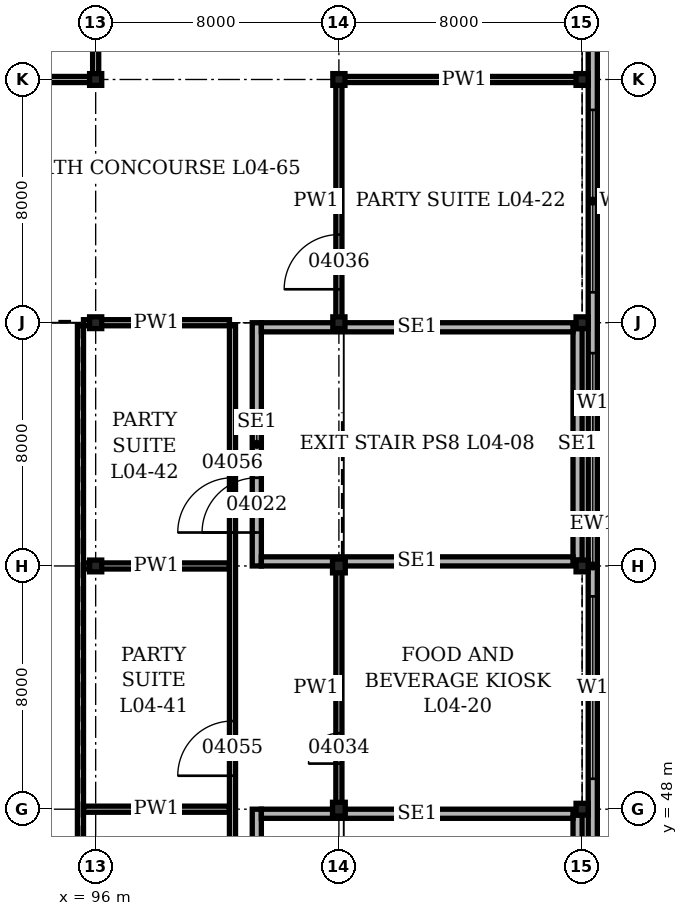
"""IFC4 building model, lengths in metres.
Left out: names, types, materials, properties, quantities, classifications, styles, units other than length and angle.
Written with IfcOpenShell. Run it as: python <this file> out.ifc"""

import sys

from ifc_helpers import new_model, si_unit, direction, frame, frame_2d, origin, origin_2d, place, context, subcontext, project, spatial, rectangle, i_section, extrude, element, fill, save


model = new_model("IFC4")
c1 = context("Model", 3, precision=1e-05, world=origin(), true_north=direction((0.0, 1.0)))
c2 = subcontext(c1, "Body", "Model", "MODEL_VIEW")
j1 = project(units=[si_unit("LENGTHUNIT", "METRE"), si_unit("PLANEANGLEUNIT", "RADIAN")], contexts=[c1])
p1 = place(None, origin())
s1 = spatial("IfcSite", under=j1, at=p1, CompositionType="ELEMENT")
p2 = place(p1, origin())
s2 = spatial("IfcBuilding", under=s1, at=p2, CompositionType="ELEMENT")
p3 = place(p2, frame((0.0, 0.0, 19.9)))
s3 = spatial("IfcBuildingStorey", under=s2, at=p3, CompositionType="ELEMENT", Elevation=19.9)
for number, where, z_axis, x_axis in (
    (1, (96.0, 56.0, 0.0), (0.0, 0.0, 1.0), (1.0, 0.0, 0.0)),
    (2, (96.0, 64.0, 0.0), (0.0, 0.0, 1.0), (1.0, 0.0, 0.0)),
    (3, (96.0, 72.0, 0.0), (0.0, 0.0, 1.0), (1.0, 0.0, 0.0)),
):
    element("IfcColumn", number, at=place(p3, frame(where, z_axis=z_axis, x_axis=x_axis)), inside=s3, PredefinedType="COLUMN", context=c2, shape_type="SweptSolid", body=[
        extrude(i_section(OverallWidth=0.399, OverallDepth=0.386, WebThickness=0.021, FlangeThickness=0.033, at=origin_2d()), origin(), (0.0, 0.0, 1.0), 6.0),
    ])
for number, where, z_axis, x_axis in (
    (4, (104.0, 48.0, 0.0), (0.0, 0.0, 1.0), (1.0, 0.0, 0.0)),
    (5, (104.0, 56.0, 0.0), (0.0, 0.0, 1.0), (1.0, 0.0, 0.0)),
):
    element("IfcColumn", number, at=place(p3, frame(where, z_axis=z_axis, x_axis=x_axis)), inside=s3, PredefinedType="COLUMN", context=c2, shape_type="SweptSolid", body=[
        extrude(i_section(OverallWidth=0.419, OverallDepth=0.455, WebThickness=0.042, FlangeThickness=0.068, at=origin_2d()), origin(), (0.0, 0.0, 1.0), 6.0),
    ])
for number, where, z_axis, x_axis in (
    (6, (104.0, 64.0, 0.0), (0.0, 0.0, 1.0), (1.0, 0.0, 0.0)),
    (7, (104.0, 72.0, 0.0), (0.0, 0.0, 1.0), (1.0, 0.0, 0.0)),
    (8, (112.0, 48.0, 0.0), (0.0, 0.0, 1.0), (1.0, 0.0, 0.0)),
    (9, (112.0, 56.0, 0.0), (0.0, 0.0, 1.0), (1.0, 0.0, 0.0)),
    (10, (112.0, 64.0, 0.0), (0.0, 0.0, 1.0), (1.0, 0.0, 0.0)),
    (11, (112.0, 72.0, 0.0), (0.0, 0.0, 1.0), (1.0, 0.0, 0.0)),
):
    element("IfcColumn", number, at=place(p3, frame(where, z_axis=z_axis, x_axis=x_axis)), inside=s3, PredefinedType="COLUMN", context=c2, shape_type="SweptSolid", body=[
        extrude(i_section(OverallWidth=0.399, OverallDepth=0.386, WebThickness=0.021, FlangeThickness=0.033, at=origin_2d()), origin(), (0.0, 0.0, 1.0), 6.0),
    ])
p4 = place(p3, frame((112.35, -0.35, 0.0), z_axis=(0.0, 0.0, 1.0), x_axis=(0.0, 1.0, 0.0)))
e12 = element("IfcWall", 12, at=p4, inside=s3, PredefinedType="SOLIDWALL", context=c2, shape_type="SweptSolid", body=[
    extrude(rectangle(XDim=112.7, YDim=0.3, at=frame_2d((56.35, 0.0))), origin(), (0.0, 0.0, 1.0), 6.0),
])
p5 = place(p4, frame((1.35, 0.0, 1.0)))
e13 = element("IfcOpeningElement", 13, at=p5, cuts=e12, PredefinedType="OPENING", context=c2, shape_type="SweptSolid", body=[
    extrude(rectangle(XDim=6.0, YDim=1.5, at=frame_2d((3.0, 0.75))), frame((0.0, 0.16, 0.0), z_axis=(0.0, -1.0, 0.0), x_axis=(1.0, 0.0, 0.0)), (0.0, 0.0, 1.0), 0.32),
])
p6 = place(p4, frame((9.35, 0.0, 1.0)))
e14 = element("IfcOpeningElement", 14, at=p6, cuts=e12, PredefinedType="OPENING", context=c2, shape_type="SweptSolid", body=[
    extrude(rectangle(XDim=6.0, YDim=1.5, at=frame_2d((3.0, 0.75))), frame((0.0, 0.16, 0.0), z_axis=(0.0, -1.0, 0.0), x_axis=(1.0, 0.0, 0.0)), (0.0, 0.0, 1.0), 0.32),
])
p7 = place(p4, frame((17.35, 0.0, 1.0)))
e15 = element("IfcOpeningElement", 15, at=p7, cuts=e12, PredefinedType="OPENING", context=c2, shape_type="SweptSolid", body=[
    extrude(rectangle(XDim=6.0, YDim=1.5, at=frame_2d((3.0, 0.75))), frame((0.0, 0.16, 0.0), z_axis=(0.0, -1.0, 0.0), x_axis=(1.0, 0.0, 0.0)), (0.0, 0.0, 1.0), 0.32),
])
p8 = place(p4, frame((25.35, 0.0, 1.0)))
e16 = element("IfcOpeningElement", 16, at=p8, cuts=e12, PredefinedType="OPENING", context=c2, shape_type="SweptSolid", body=[
    extrude(rectangle(XDim=6.0, YDim=1.5, at=frame_2d((3.0, 0.75))), frame((0.0, 0.16, 0.0), z_axis=(0.0, -1.0, 0.0), x_axis=(1.0, 0.0, 0.0)), (0.0, 0.0, 1.0), 0.32),
])
p9 = place(p4, frame((33.35, 0.0, 1.0)))
e17 = element("IfcOpeningElement", 17, at=p9, cuts=e12, PredefinedType="OPENING", context=c2, shape_type="SweptSolid", body=[
    extrude(rectangle(XDim=6.0, YDim=1.5, at=frame_2d((3.0, 0.75))), frame((0.0, 0.16, 0.0), z_axis=(0.0, -1.0, 0.0), x_axis=(1.0, 0.0, 0.0)), (0.0, 0.0, 1.0), 0.32),
])
p10 = place(p4, frame((41.35, 0.0, 1.0)))
e18 = element("IfcOpeningElement", 18, at=p10, cuts=e12, PredefinedType="OPENING", context=c2, shape_type="SweptSolid", body=[
    extrude(rectangle(XDim=6.0, YDim=1.5, at=frame_2d((3.0, 0.75))), frame((0.0, 0.16, 0.0), z_axis=(0.0, -1.0, 0.0), x_axis=(1.0, 0.0, 0.0)), (0.0, 0.0, 1.0), 0.32),
])
p11 = place(p4, frame((49.35, 0.0, 1.0)))
e19 = element("IfcOpeningElement", 19, at=p11, cuts=e12, PredefinedType="OPENING", context=c2, shape_type="SweptSolid", body=[
    extrude(rectangle(XDim=6.0, YDim=1.5, at=frame_2d((3.0, 0.75))), frame((0.0, 0.16, 0.0), z_axis=(0.0, -1.0, 0.0), x_axis=(1.0, 0.0, 0.0)), (0.0, 0.0, 1.0), 0.32),
])
p12 = place(p4, frame((57.35, 0.0, 1.0)))
e20 = element("IfcOpeningElement", 20, at=p12, cuts=e12, PredefinedType="OPENING", context=c2, shape_type="SweptSolid", body=[
    extrude(rectangle(XDim=6.0, YDim=1.5, at=frame_2d((3.0, 0.75))), frame((0.0, 0.16, 0.0), z_axis=(0.0, -1.0, 0.0), x_axis=(1.0, 0.0, 0.0)), (0.0, 0.0, 1.0), 0.32),
])
p13 = place(p4, frame((65.35, 0.0, 1.0)))
e21 = element("IfcOpeningElement", 21, at=p13, cuts=e12, PredefinedType="OPENING", context=c2, shape_type="SweptSolid", body=[
    extrude(rectangle(XDim=6.0, YDim=1.5, at=frame_2d((3.0, 0.75))), frame((0.0, 0.16, 0.0), z_axis=(0.0, -1.0, 0.0), x_axis=(1.0, 0.0, 0.0)), (0.0, 0.0, 1.0), 0.32),
])
p14 = place(p4, frame((73.35, 0.0, 1.0)))
e22 = element("IfcOpeningElement", 22, at=p14, cuts=e12, PredefinedType="OPENING", context=c2, shape_type="SweptSolid", body=[
    extrude(rectangle(XDim=6.0, YDim=1.5, at=frame_2d((3.0, 0.75))), frame((0.0, 0.16, 0.0), z_axis=(0.0, -1.0, 0.0), x_axis=(1.0, 0.0, 0.0)), (0.0, 0.0, 1.0), 0.32),
])
p15 = place(p4, frame((81.35, 0.0, 1.0)))
e23 = element("IfcOpeningElement", 23, at=p15, cuts=e12, PredefinedType="OPENING", context=c2, shape_type="SweptSolid", body=[
    extrude(rectangle(XDim=6.0, YDim=1.5, at=frame_2d((3.0, 0.75))), frame((0.0, 0.16, 0.0), z_axis=(0.0, -1.0, 0.0), x_axis=(1.0, 0.0, 0.0)), (0.0, 0.0, 1.0), 0.32),
])
p16 = place(p4, frame((89.35, 0.0, 1.0)))
e24 = element("IfcOpeningElement", 24, at=p16, cuts=e12, PredefinedType="OPENING", context=c2, shape_type="SweptSolid", body=[
    extrude(rectangle(XDim=6.0, YDim=1.5, at=frame_2d((3.0, 0.75))), frame((0.0, 0.16, 0.0), z_axis=(0.0, -1.0, 0.0), x_axis=(1.0, 0.0, 0.0)), (0.0, 0.0, 1.0), 0.32),
])
p17 = place(p4, frame((97.35, 0.0, 1.0)))
e25 = element("IfcOpeningElement", 25, at=p17, cuts=e12, PredefinedType="OPENING", context=c2, shape_type="SweptSolid", body=[
    extrude(rectangle(XDim=6.0, YDim=1.5, at=frame_2d((3.0, 0.75))), frame((0.0, 0.16, 0.0), z_axis=(0.0, -1.0, 0.0), x_axis=(1.0, 0.0, 0.0)), (0.0, 0.0, 1.0), 0.32),
])
p18 = place(p4, frame((105.35, 0.0, 1.0)))
e26 = element("IfcOpeningElement", 26, at=p18, cuts=e12, PredefinedType="OPENING", context=c2, shape_type="SweptSolid", body=[
    extrude(rectangle(XDim=6.0, YDim=1.5, at=frame_2d((3.0, 0.75))), frame((0.0, 0.16, 0.0), z_axis=(0.0, -1.0, 0.0), x_axis=(1.0, 0.0, 0.0)), (0.0, 0.0, 1.0), 0.32),
])
p19 = place(p3, frame((101.3, 40.0, 0.0), z_axis=(0.0, 0.0, 1.0), x_axis=(0.0, 1.0, 0.0)))
e27 = element("IfcWall", 27, at=p19, inside=s3, PredefinedType="SOLIDWALL", context=c2, shape_type="SweptSolid", body=[
    extrude(rectangle(XDim=8.0, YDim=0.3, at=frame_2d((4.0, 0.0))), origin(), (0.0, 0.0, 1.0), 5.75),
])
p20 = place(p19, frame((1.1, 0.0, 0.0)))
e28 = element("IfcOpeningElement", 28, at=p20, cuts=e27, PredefinedType="OPENING", context=c2, shape_type="SweptSolid", body=[
    extrude(rectangle(XDim=1.8, YDim=2.1, at=frame_2d((0.9, 1.05))), frame((0.0, 0.16, 0.0), z_axis=(0.0, -1.0, 0.0), x_axis=(1.0, 0.0, 0.0)), (0.0, 0.0, 1.0), 0.32),
])
p21 = place(p3, frame((111.85, 40.193, 0.0), z_axis=(0.0, 0.0, 1.0), x_axis=(0.0, 1.0, 0.0)))
e29 = element("IfcWall", 29, at=p21, inside=s3, PredefinedType="SOLIDWALL", context=c2, shape_type="SweptSolid", body=[
    extrude(rectangle(XDim=7.614, YDim=0.3, at=frame_2d((3.807, 0.0))), origin(), (0.0, 0.0, 1.0), 5.75),
])
p22 = place(p3, frame((101.45, 47.85, 0.0), z_axis=(0.0, 0.0, 1.0), x_axis=(1.0, 0.0, 0.0)))
e30 = element("IfcWall", 30, at=p22, inside=s3, PredefinedType="SOLIDWALL", context=c2, shape_type="SweptSolid", body=[
    extrude(rectangle(XDim=10.25, YDim=0.3, at=frame_2d((5.125, 0.0))), origin(), (0.0, 0.0, 1.0), 5.75),
])
p23 = place(p3, frame((101.3, 56.0, 0.0), z_axis=(0.0, 0.0, 1.0), x_axis=(0.0, 1.0, 0.0)))
e31 = element("IfcWall", 31, at=p23, inside=s3, PredefinedType="SOLIDWALL", context=c2, shape_type="SweptSolid", body=[
    extrude(rectangle(XDim=8.0, YDim=0.3, at=frame_2d((4.0, 0.0))), origin(), (0.0, 0.0, 1.0), 5.75),
])
p24 = place(p23, frame((1.1, 0.0, 0.0)))
e32 = element("IfcOpeningElement", 32, at=p24, cuts=e31, PredefinedType="OPENING", context=c2, shape_type="SweptSolid", body=[
    extrude(rectangle(XDim=1.8, YDim=2.1, at=frame_2d((0.9, 1.05))), frame((0.0, 0.16, 0.0), z_axis=(0.0, -1.0, 0.0), x_axis=(1.0, 0.0, 0.0)), (0.0, 0.0, 1.0), 0.32),
])
p25 = place(p3, frame((111.85, 56.193, 0.0), z_axis=(0.0, 0.0, 1.0), x_axis=(0.0, 1.0, 0.0)))
e33 = element("IfcWall", 33, at=p25, inside=s3, PredefinedType="SOLIDWALL", context=c2, shape_type="SweptSolid", body=[
    extrude(rectangle(XDim=7.614, YDim=0.3, at=frame_2d((3.807, 0.0))), origin(), (0.0, 0.0, 1.0), 5.75),
])
for number, where, z_axis, x_axis in (
    (34, (101.45, 56.15, 0.0), (0.0, 0.0, 1.0), (1.0, 0.0, 0.0)),
    (35, (101.45, 63.85, 0.0), (0.0, 0.0, 1.0), (1.0, 0.0, 0.0)),
):
    element("IfcWall", number, at=place(p3, frame(where, z_axis=z_axis, x_axis=x_axis)), inside=s3, PredefinedType="SOLIDWALL", context=c2, shape_type="SweptSolid", body=[
        extrude(rectangle(XDim=10.25, YDim=0.3, at=frame_2d((5.125, 0.0))), origin(), (0.0, 0.0, 1.0), 5.75),
    ])
p26 = place(p3, frame((95.6, 48.0, 0.0), z_axis=(0.0, 0.0, 1.0), x_axis=(1.0, 0.0, 0.0)))
e36 = element("IfcWall", 36, at=p26, inside=s3, PredefinedType="PARTITIONING", context=c2, shape_type="SweptSolid", body=[
    extrude(rectangle(XDim=4.8, YDim=0.2, at=frame_2d((2.4, 0.0))), origin(), (0.0, 0.0, 1.0), 5.75),
])
p27 = place(p3, frame((95.6, 56.0, 0.0), z_axis=(0.0, 0.0, 1.0), x_axis=(1.0, 0.0, 0.0)))
e37 = element("IfcWall", 37, at=p27, inside=s3, PredefinedType="PARTITIONING", context=c2, shape_type="SweptSolid", body=[
    extrude(rectangle(XDim=4.8, YDim=0.2, at=frame_2d((2.4, 0.0))), origin(), (0.0, 0.0, 1.0), 4.55),
])
p28 = place(p3, frame((95.6, 64.0, 0.0), z_axis=(0.0, 0.0, 1.0), x_axis=(1.0, 0.0, 0.0)))
e38 = element("IfcWall", 38, at=p28, inside=s3, PredefinedType="PARTITIONING", context=c2, shape_type="SweptSolid", body=[
    extrude(rectangle(XDim=4.8, YDim=0.2, at=frame_2d((2.4, 0.0))), origin(), (0.0, 0.0, 1.0), 4.978),
])
p29 = place(p3, frame((72.1, 72.0, 0.0), z_axis=(0.0, 0.0, 1.0), x_axis=(1.0, 0.0, 0.0)))
e39 = element("IfcWall", 39, at=p29, inside=s3, PredefinedType="PARTITIONING", context=c2, shape_type="SweptSolid", body=[
    extrude(rectangle(XDim=23.8, YDim=0.2, at=frame_2d((11.9, 0.0))), origin(), (0.0, 0.0, 1.0), 4.978),
])
p30 = place(p29, frame((1.0, 0.0, 0.0)))
e40 = element("IfcOpeningElement", 40, at=p30, cuts=e39, PredefinedType="OPENING", context=c2, shape_type="SweptSolid", body=[
    extrude(rectangle(XDim=1.8, YDim=2.4, at=frame_2d((0.9, 1.2))), frame((0.0, 0.11, 0.0), z_axis=(0.0, -1.0, 0.0), x_axis=(1.0, 0.0, 0.0)), (0.0, 0.0, 1.0), 0.22),
])
p31 = place(p3, frame((104.1, 72.0, 0.0), z_axis=(0.0, 0.0, 1.0), x_axis=(1.0, 0.0, 0.0)))
e41 = element("IfcWall", 41, at=p31, inside=s3, PredefinedType="PARTITIONING", context=c2, shape_type="SweptSolid", body=[
    extrude(rectangle(XDim=8.05, YDim=0.2, at=frame_2d((4.025, 0.0))), origin(), (0.0, 0.0, 1.0), 4.978),
])
p32 = place(p3, frame((95.5, 16.1, 0.0), z_axis=(0.0, 0.0, 1.0), x_axis=(0.0, 1.0, 0.0)))
e42 = element("IfcWall", 42, at=p32, inside=s3, PredefinedType="PARTITIONING", context=c2, shape_type="SweptSolid", body=[
    extrude(rectangle(XDim=47.8, YDim=0.2, at=frame_2d((23.9, 0.0))), origin(), (0.0, 0.0, 1.0), 5.75),
])
p33 = place(p3, frame((96.0, 72.1, 0.0), z_axis=(0.0, 0.0, 1.0), x_axis=(0.0, 1.0, 0.0)))
e43 = element("IfcWall", 43, at=p33, inside=s3, PredefinedType="PARTITIONING", context=c2, shape_type="SweptSolid", body=[
    extrude(rectangle(XDim=15.9, YDim=0.2, at=frame_2d((7.95, 0.0))), origin(), (0.0, 0.0, 1.0), 4.978),
])
p34 = place(p3, frame((100.5, 8.6, 0.0), z_axis=(0.0, 0.0, 1.0), x_axis=(0.0, 1.0, 0.0)))
e44 = element("IfcWall", 44, at=p34, inside=s3, PredefinedType="PARTITIONING", context=c2, shape_type="SweptSolid", body=[
    extrude(rectangle(XDim=55.3, YDim=0.2, at=frame_2d((27.65, 0.0))), origin(), (0.0, 0.0, 1.0), 5.75),
])
p35 = place(p34, frame((1.0, 0.0, 0.0)))
e45 = element("IfcOpeningElement", 45, at=p35, cuts=e44, PredefinedType="OPENING", context=c2, shape_type="SweptSolid", body=[
    extrude(rectangle(XDim=1.8, YDim=2.4, at=frame_2d((0.9, 1.2))), frame((0.0, 0.11, 0.0), z_axis=(0.0, -1.0, 0.0), x_axis=(1.0, 0.0, 0.0)), (0.0, 0.0, 1.0), 0.22),
])
p36 = place(p34, frame((8.5, 0.0, 0.0)))
e46 = element("IfcOpeningElement", 46, at=p36, cuts=e44, PredefinedType="OPENING", context=c2, shape_type="SweptSolid", body=[
    extrude(rectangle(XDim=1.8, YDim=2.4, at=frame_2d((0.9, 1.2))), frame((0.0, 0.11, 0.0), z_axis=(0.0, -1.0, 0.0), x_axis=(1.0, 0.0, 0.0)), (0.0, 0.0, 1.0), 0.22),
])
p37 = place(p34, frame((16.5, 0.0, 0.0)))
e47 = element("IfcOpeningElement", 47, at=p37, cuts=e44, PredefinedType="OPENING", context=c2, shape_type="SweptSolid", body=[
    extrude(rectangle(XDim=1.8, YDim=2.4, at=frame_2d((0.9, 1.2))), frame((0.0, 0.11, 0.0), z_axis=(0.0, -1.0, 0.0), x_axis=(1.0, 0.0, 0.0)), (0.0, 0.0, 1.0), 0.22),
])
p38 = place(p34, frame((24.5, 0.0, 0.0)))
e48 = element("IfcOpeningElement", 48, at=p38, cuts=e44, PredefinedType="OPENING", context=c2, shape_type="SweptSolid", body=[
    extrude(rectangle(XDim=1.8, YDim=2.4, at=frame_2d((0.9, 1.2))), frame((0.0, 0.11, 0.0), z_axis=(0.0, -1.0, 0.0), x_axis=(1.0, 0.0, 0.0)), (0.0, 0.0, 1.0), 0.22),
])
p39 = place(p34, frame((32.5, 0.0, 0.0)))
e49 = element("IfcOpeningElement", 49, at=p39, cuts=e44, PredefinedType="OPENING", context=c2, shape_type="SweptSolid", body=[
    extrude(rectangle(XDim=1.8, YDim=2.4, at=frame_2d((0.9, 1.2))), frame((0.0, 0.11, 0.0), z_axis=(0.0, -1.0, 0.0), x_axis=(1.0, 0.0, 0.0)), (0.0, 0.0, 1.0), 0.22),
])
p40 = place(p34, frame((40.5, 0.0, 0.0)))
e50 = element("IfcOpeningElement", 50, at=p40, cuts=e44, PredefinedType="OPENING", context=c2, shape_type="SweptSolid", body=[
    extrude(rectangle(XDim=1.8, YDim=2.4, at=frame_2d((0.9, 1.2))), frame((0.0, 0.11, 0.0), z_axis=(0.0, -1.0, 0.0), x_axis=(1.0, 0.0, 0.0)), (0.0, 0.0, 1.0), 0.22),
])
p41 = place(p34, frame((48.5, 0.0, 0.0)))
e51 = element("IfcOpeningElement", 51, at=p41, cuts=e44, PredefinedType="OPENING", context=c2, shape_type="SweptSolid", body=[
    extrude(rectangle(XDim=1.8, YDim=2.4, at=frame_2d((0.9, 1.2))), frame((0.0, 0.11, 0.0), z_axis=(0.0, -1.0, 0.0), x_axis=(1.0, 0.0, 0.0)), (0.0, 0.0, 1.0), 0.22),
])
p42 = place(p3, frame((104.0, 48.1, 0.0), z_axis=(0.0, 0.0, 1.0), x_axis=(0.0, 1.0, 0.0)))
e52 = element("IfcWall", 52, at=p42, inside=s3, PredefinedType="PARTITIONING", context=c2, shape_type="SweptSolid", body=[
    extrude(rectangle(XDim=7.8, YDim=0.2, at=frame_2d((3.9, 0.0))), origin(), (0.0, 0.0, 1.0), 4.978),
])
p43 = place(p42, frame((1.4, 0.0, 0.0)))
e53 = element("IfcOpeningElement", 53, at=p43, cuts=e52, PredefinedType="OPENING", context=c2, shape_type="SweptSolid", body=[
    extrude(rectangle(XDim=1.0, YDim=2.1, at=frame_2d((0.5, 1.05))), frame((0.0, 0.11, 0.0), z_axis=(0.0, -1.0, 0.0), x_axis=(1.0, 0.0, 0.0)), (0.0, 0.0, 1.0), 0.22),
])
p44 = place(p3, frame((104.0, 64.1, 0.0), z_axis=(0.0, 0.0, 1.0), x_axis=(0.0, 1.0, 0.0)))
e54 = element("IfcWall", 54, at=p44, inside=s3, PredefinedType="PARTITIONING", context=c2, shape_type="SweptSolid", body=[
    extrude(rectangle(XDim=7.8, YDim=0.2, at=frame_2d((3.9, 0.0))), origin(), (0.0, 0.0, 1.0), 4.978),
])
p45 = place(p44, frame((1.0, 0.0, 0.0)))
e55 = element("IfcOpeningElement", 55, at=p45, cuts=e54, PredefinedType="OPENING", context=c2, shape_type="SweptSolid", body=[
    extrude(rectangle(XDim=1.8, YDim=2.4, at=frame_2d((0.9, 1.2))), frame((0.0, 0.11, 0.0), z_axis=(0.0, -1.0, 0.0), x_axis=(1.0, 0.0, 0.0)), (0.0, 0.0, 1.0), 0.22),
])
p46 = place(p11, origin())
e56 = element("IfcWindow", 56, at=p46, inside=s3, PartitioningType="SINGLE_PANEL", PredefinedType="WINDOW", context=c2, shape_type="SweptSolid", body=[
    extrude(rectangle(XDim=6.0, YDim=1.5, at=frame_2d((3.0, 0.75))), frame((0.0, 0.03, 0.0), z_axis=(0.0, -1.0, 0.0), x_axis=(1.0, 0.0, 0.0)), (0.0, 0.0, 1.0), 0.06),
])
fill(e19, e56)
p47 = place(p12, origin())
e57 = element("IfcWindow", 57, at=p47, inside=s3, PartitioningType="SINGLE_PANEL", PredefinedType="WINDOW", context=c2, shape_type="SweptSolid", body=[
    extrude(rectangle(XDim=6.0, YDim=1.5, at=frame_2d((3.0, 0.75))), frame((0.0, 0.03, 0.0), z_axis=(0.0, -1.0, 0.0), x_axis=(1.0, 0.0, 0.0)), (0.0, 0.0, 1.0), 0.06),
])
fill(e20, e57)
p48 = place(p13, origin())
e58 = element("IfcWindow", 58, at=p48, inside=s3, PartitioningType="SINGLE_PANEL", PredefinedType="WINDOW", context=c2, shape_type="SweptSolid", body=[
    extrude(rectangle(XDim=6.0, YDim=1.5, at=frame_2d((3.0, 0.75))), frame((0.0, 0.03, 0.0), z_axis=(0.0, -1.0, 0.0), x_axis=(1.0, 0.0, 0.0)), (0.0, 0.0, 1.0), 0.06),
])
fill(e21, e58)
p49 = place(p24, origin())
e59 = element("IfcDoor", 59, at=p49, inside=s3, OperationType="DOUBLE_DOOR_SINGLE_SWING", PredefinedType="DOOR", context=c2, shape_type="SweptSolid", body=[
    extrude(rectangle(XDim=1.8, YDim=2.1, at=frame_2d((0.9, 1.05))), frame((0.0, 0.15, 0.0), z_axis=(0.0, -1.0, 0.0), x_axis=(1.0, 0.0, 0.0)), (0.0, 0.0, 1.0), 0.3),
])
fill(e32, e59)
p50 = place(p43, origin())
e60 = element("IfcDoor", 60, at=p50, inside=s3, OperationType="SINGLE_SWING_LEFT", PredefinedType="DOOR", context=c2, shape_type="SweptSolid", body=[
    extrude(rectangle(XDim=1.0, YDim=2.1, at=frame_2d((0.5, 1.05))), frame((0.0, 0.1, 0.0), z_axis=(0.0, -1.0, 0.0), x_axis=(1.0, 0.0, 0.0)), (0.0, 0.0, 1.0), 0.199),
])
fill(e53, e60)
p51 = place(p45, origin())
e61 = element("IfcDoor", 61, at=p51, inside=s3, OperationType="DOUBLE_DOOR_DOUBLE_SWING", PredefinedType="DOOR", context=c2, shape_type="SweptSolid", body=[
    extrude(rectangle(XDim=1.8, YDim=2.4, at=frame_2d((0.9, 1.2))), frame((0.0, 0.1, 0.0), z_axis=(0.0, -1.0, 0.0), x_axis=(1.0, 0.0, 0.0)), (0.0, 0.0, 1.0), 0.199),
])
fill(e55, e61)
p52 = place(p40, origin())
e62 = element("IfcDoor", 62, at=p52, inside=s3, OperationType="DOUBLE_DOOR_DOUBLE_SWING", PredefinedType="DOOR", context=c2, shape_type="SweptSolid", body=[
    extrude(rectangle(XDim=1.8, YDim=2.4, at=frame_2d((0.9, 1.2))), frame((0.0, 0.1, 0.0), z_axis=(0.0, -1.0, 0.0), x_axis=(1.0, 0.0, 0.0)), (0.0, 0.0, 1.0), 0.199),
])
fill(e50, e62)
p53 = place(p41, origin())
e63 = element("IfcDoor", 63, at=p53, inside=s3, OperationType="DOUBLE_DOOR_DOUBLE_SWING", PredefinedType="DOOR", context=c2, shape_type="SweptSolid", body=[
    extrude(rectangle(XDim=1.8, YDim=2.4, at=frame_2d((0.9, 1.2))), frame((0.0, 0.1, 0.0), z_axis=(0.0, -1.0, 0.0), x_axis=(1.0, 0.0, 0.0)), (0.0, 0.0, 1.0), 0.199),
])
fill(e51, e63)
save(model, sys.argv[1])
